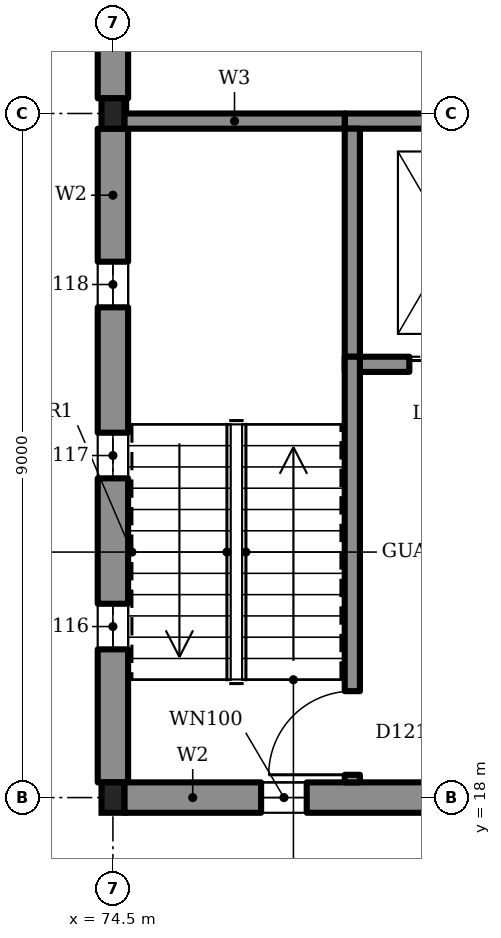
"""IFC4 building model, lengths in metres.
Left out: names, types, materials, properties, quantities, classifications, styles, units other than length and angle.
Written with IfcOpenShell. Run it as: python <this file> out.ifc"""

import sys

from ifc_helpers import new_model, si_unit, direction, frame, frame_2d, origin, origin_2d, place, context, subcontext, project, spatial, rectangle, i_section, extrude, element, fill, save


model = new_model("IFC4")
c1 = context("Model", 3, precision=1e-05, world=origin(), true_north=direction((0.0, 1.0)))
c2 = subcontext(c1, "Body", "Model", "MODEL_VIEW")
j1 = project(units=[si_unit("LENGTHUNIT", "METRE"), si_unit("PLANEANGLEUNIT", "RADIAN")], contexts=[c1])
p1 = place(None, origin())
s1 = spatial("IfcSite", under=j1, at=p1, CompositionType="ELEMENT")
p2 = place(p1, origin())
s2 = spatial("IfcBuilding", under=s1, at=p2, CompositionType="ELEMENT")
p3 = place(p2, frame((0.0, 0.0, 14.4)))
s3 = spatial("IfcBuildingStorey", under=s2, at=p3, CompositionType="ELEMENT", Elevation=14.4)
for number, where, z_axis, x_axis in (
    (1, (74.5, 18.0, 0.0), (0.0, 0.0, 1.0), (1.0, 0.0, 0.0)),
    (2, (74.5, 27.0, 0.0), (0.0, 0.0, 1.0), (1.0, 0.0, 0.0)),
):
    element("IfcColumn", number, at=place(p3, frame(where, z_axis=z_axis, x_axis=x_axis)), inside=s3, PredefinedType="COLUMN", context=c2, shape_type="SweptSolid", body=[
        extrude(i_section(OverallWidth=0.3, OverallDepth=0.4, WebThickness=0.013, FlangeThickness=0.024, FilletRadius=0.027, at=origin_2d()), origin(), (0.0, 0.0, 1.0), 4.5),
    ])
p4 = place(p3, frame((77.55, 23.7, 0.0), z_axis=(0.0, 0.0, 1.0), x_axis=(1.0, 0.0, 0.0)))
e3 = element("IfcWall", 3, at=p4, inside=s3, PredefinedType="SOLIDWALL", context=c2, shape_type="SweptSolid", body=[
    extrude(rectangle(XDim=5.4, YDim=0.2, at=frame_2d((2.7, 0.0))), origin(), (0.0, 0.0, 1.0), 4.25),
])
p5 = place(p4, frame((0.85, 0.0, 0.0)))
e4 = element("IfcOpeningElement", 4, at=p5, cuts=e3, PredefinedType="OPENING", context=c2, shape_type="SweptSolid", body=[
    extrude(rectangle(XDim=1.1, YDim=2.1, at=frame_2d((0.55, 1.05))), frame((0.0, 0.11, 0.0), z_axis=(0.0, -1.0, 0.0), x_axis=(1.0, 0.0, 0.0)), (0.0, 0.0, 1.0), 0.22),
])
p6 = place(p4, frame((3.55, 0.0, 0.0)))
e5 = element("IfcOpeningElement", 5, at=p6, cuts=e3, PredefinedType="OPENING", context=c2, shape_type="SweptSolid", body=[
    extrude(rectangle(XDim=0.9, YDim=2.1, at=frame_2d((0.45, 1.05))), frame((0.0, 0.11, 0.0), z_axis=(0.0, -1.0, 0.0), x_axis=(1.0, 0.0, 0.0)), (0.0, 0.0, 1.0), 0.22),
])
p7 = place(p3, frame((77.55, 26.9, 0.0), z_axis=(0.0, 0.0, 1.0), x_axis=(1.0, 0.0, 0.0)))
e6 = element("IfcWall", 6, at=p7, inside=s3, PredefinedType="SOLIDWALL", context=c2, shape_type="SweptSolid", body=[
    extrude(rectangle(XDim=5.4, YDim=0.2, at=frame_2d((2.7, 0.0))), origin(), (0.0, 0.0, 1.0), 4.25),
])
p8 = place(p3, frame((77.65, 23.8, 0.0), z_axis=(0.0, 0.0, 1.0), x_axis=(0.0, 1.0, 0.0)))
e7 = element("IfcWall", 7, at=p8, inside=s3, PredefinedType="SOLIDWALL", context=c2, shape_type="SweptSolid", body=[
    extrude(rectangle(XDim=3.0, YDim=0.2, at=frame_2d((1.5, 0.0))), origin(), (0.0, 0.0, 1.0), 4.25),
])
p9 = place(p3, frame((74.65, 18.0, 0.0), z_axis=(0.0, 0.0, 1.0), x_axis=(1.0, 0.0, 0.0)))
e8 = element("IfcWall", 8, at=p9, inside=s3, PredefinedType="SOLIDWALL", context=c2, shape_type="SweptSolid", body=[
    extrude(rectangle(XDim=8.7, YDim=0.4, at=frame_2d((4.35, 0.0))), origin(), (0.0, 0.0, 1.0), 4.5),
])
p10 = place(p9, frame((1.8, 0.0, 0.9)))
e9 = element("IfcOpeningElement", 9, at=p10, cuts=e8, PredefinedType="OPENING", context=c2, shape_type="SweptSolid", body=[
    extrude(rectangle(XDim=0.6, YDim=2.4, at=frame_2d((0.3, 1.2))), frame((0.0, 0.21, 0.0), z_axis=(0.0, -1.0, 0.0), x_axis=(1.0, 0.0, 0.0)), (0.0, 0.0, 1.0), 0.42),
])
p11 = place(p9, frame((4.05, 0.0, 0.9)))
e10 = element("IfcOpeningElement", 10, at=p11, cuts=e8, PredefinedType="OPENING", context=c2, shape_type="SweptSolid", body=[
    extrude(rectangle(XDim=0.6, YDim=2.4, at=frame_2d((0.3, 1.2))), frame((0.0, 0.21, 0.0), z_axis=(0.0, -1.0, 0.0), x_axis=(1.0, 0.0, 0.0)), (0.0, 0.0, 1.0), 0.42),
])
p12 = place(p9, frame((6.3, 0.0, 0.9)))
e11 = element("IfcOpeningElement", 11, at=p12, cuts=e8, PredefinedType="OPENING", context=c2, shape_type="SweptSolid", body=[
    extrude(rectangle(XDim=0.6, YDim=2.4, at=frame_2d((0.3, 1.2))), frame((0.0, 0.21, 0.0), z_axis=(0.0, -1.0, 0.0), x_axis=(1.0, 0.0, 0.0)), (0.0, 0.0, 1.0), 0.42),
])
p13 = place(p3, frame((74.5, 18.2, 0.0), z_axis=(0.0, 0.0, 1.0), x_axis=(0.0, 1.0, 0.0)))
e12 = element("IfcWall", 12, at=p13, inside=s3, PredefinedType="SOLIDWALL", context=c2, shape_type="SweptSolid", body=[
    extrude(rectangle(XDim=8.6, YDim=0.4, at=frame_2d((4.3, 0.0))), origin(), (0.0, 0.0, 1.0), 4.5),
])
p14 = place(p13, frame((1.75, 0.0, 0.9)))
e13 = element("IfcOpeningElement", 13, at=p14, cuts=e12, PredefinedType="OPENING", context=c2, shape_type="SweptSolid", body=[
    extrude(rectangle(XDim=0.6, YDim=2.4, at=frame_2d((0.3, 1.2))), frame((0.0, 0.21, 0.0), z_axis=(0.0, -1.0, 0.0), x_axis=(1.0, 0.0, 0.0)), (0.0, 0.0, 1.0), 0.42),
])
p15 = place(p13, frame((4.0, 0.0, 0.9)))
e14 = element("IfcOpeningElement", 14, at=p15, cuts=e12, PredefinedType="OPENING", context=c2, shape_type="SweptSolid", body=[
    extrude(rectangle(XDim=0.6, YDim=2.4, at=frame_2d((0.3, 1.2))), frame((0.0, 0.21, 0.0), z_axis=(0.0, -1.0, 0.0), x_axis=(1.0, 0.0, 0.0)), (0.0, 0.0, 1.0), 0.42),
])
p16 = place(p13, frame((6.25, 0.0, 0.9)))
e15 = element("IfcOpeningElement", 15, at=p16, cuts=e12, PredefinedType="OPENING", context=c2, shape_type="SweptSolid", body=[
    extrude(rectangle(XDim=0.6, YDim=2.4, at=frame_2d((0.3, 1.2))), frame((0.0, 0.21, 0.0), z_axis=(0.0, -1.0, 0.0), x_axis=(1.0, 0.0, 0.0)), (0.0, 0.0, 1.0), 0.42),
])
p17 = place(p3, frame((74.5, 27.2, 0.0), z_axis=(0.0, 0.0, 1.0), x_axis=(0.0, 1.0, 0.0)))
e16 = element("IfcWall", 16, at=p17, inside=s3, PredefinedType="SOLIDWALL", context=c2, shape_type="SweptSolid", body=[
    extrude(rectangle(XDim=8.6, YDim=0.4, at=frame_2d((4.3, 0.0))), origin(), (0.0, 0.0, 1.0), 4.5),
])
p18 = place(p17, frame((1.825, 0.0, 0.9)))
e17 = element("IfcOpeningElement", 17, at=p18, cuts=e16, PredefinedType="OPENING", context=c2, shape_type="SweptSolid", body=[
    extrude(rectangle(XDim=0.45, YDim=2.6, at=frame_2d((0.225, 1.3))), frame((0.0, 0.21, 0.0), z_axis=(0.0, -1.0, 0.0), x_axis=(1.0, 0.0, 0.0)), (0.0, 0.0, 1.0), 0.42),
])
p19 = place(p17, frame((4.075, 0.0, 0.9)))
e18 = element("IfcOpeningElement", 18, at=p19, cuts=e16, PredefinedType="OPENING", context=c2, shape_type="SweptSolid", body=[
    extrude(rectangle(XDim=0.45, YDim=2.6, at=frame_2d((0.225, 1.3))), frame((0.0, 0.21, 0.0), z_axis=(0.0, -1.0, 0.0), x_axis=(1.0, 0.0, 0.0)), (0.0, 0.0, 1.0), 0.42),
])
p20 = place(p17, frame((6.325, 0.0, 0.9)))
e19 = element("IfcOpeningElement", 19, at=p20, cuts=e16, PredefinedType="OPENING", context=c2, shape_type="SweptSolid", body=[
    extrude(rectangle(XDim=0.45, YDim=2.6, at=frame_2d((0.225, 1.3))), frame((0.0, 0.21, 0.0), z_axis=(0.0, -1.0, 0.0), x_axis=(1.0, 0.0, 0.0)), (0.0, 0.0, 1.0), 0.42),
])
p21 = place(p3, frame((74.65, 26.9, 0.0), z_axis=(0.0, 0.0, 1.0), x_axis=(1.0, 0.0, 0.0)))
e20 = element("IfcWall", 20, at=p21, inside=s3, PredefinedType="SOLIDWALL", context=c2, shape_type="SweptSolid", body=[
    extrude(rectangle(XDim=2.9, YDim=0.2, at=frame_2d((1.45, 0.0))), origin(), (0.0, 0.0, 1.0), 4.25),
])
p22 = place(p3, frame((77.65, 18.2, 0.0), z_axis=(0.0, 0.0, 1.0), x_axis=(0.0, 1.0, 0.0)))
e21 = element("IfcWall", 21, at=p22, inside=s3, PredefinedType="SOLIDWALL", context=c2, shape_type="SweptSolid", body=[
    extrude(rectangle(XDim=5.6, YDim=0.2, at=frame_2d((2.8, 0.0))), origin(), (0.0, 0.0, 1.0), 4.25),
])
p23 = place(p22, frame((0.1, 0.0, 0.0)))
e22 = element("IfcOpeningElement", 22, at=p23, cuts=e21, PredefinedType="OPENING", context=c2, shape_type="SweptSolid", body=[
    extrude(rectangle(XDim=1.1, YDim=2.1, at=frame_2d((0.55, 1.05))), frame((0.0, 0.11, 0.0), z_axis=(0.0, -1.0, 0.0), x_axis=(1.0, 0.0, 0.0)), (0.0, 0.0, 1.0), 0.22),
])
p24 = place(p5, origin())
e23 = element("IfcDoor", 23, at=p24, inside=s3, OperationType="SLIDING_TO_LEFT", PredefinedType="DOOR", context=c2, shape_type="SweptSolid", body=[
    extrude(rectangle(XDim=1.1, YDim=2.1, at=frame_2d((0.55, 1.05))), frame((0.0, 0.025, 0.0), z_axis=(0.0, -1.0, 0.0), x_axis=(1.0, 0.0, 0.0)), (0.0, 0.0, 1.0), 0.05),
])
fill(e4, e23)
p25 = place(p10, origin())
e24 = element("IfcWindow", 24, at=p25, inside=s3, PartitioningType="SINGLE_PANEL", PredefinedType="WINDOW", context=c2, shape_type="SweptSolid", body=[
    extrude(rectangle(XDim=0.6, YDim=2.4, at=frame_2d((0.3, 1.2))), frame((0.0, 0.03, 0.0), z_axis=(0.0, -1.0, 0.0), x_axis=(1.0, 0.0, 0.0)), (0.0, 0.0, 1.0), 0.06),
])
fill(e9, e24)
p26 = place(p14, origin())
e25 = element("IfcWindow", 25, at=p26, inside=s3, PartitioningType="SINGLE_PANEL", PredefinedType="WINDOW", context=c2, shape_type="SweptSolid", body=[
    extrude(rectangle(XDim=0.6, YDim=2.4, at=frame_2d((0.3, 1.2))), frame((0.0, 0.03, 0.0), z_axis=(0.0, -1.0, 0.0), x_axis=(1.0, 0.0, 0.0)), (0.0, 0.0, 1.0), 0.06),
])
fill(e13, e25)
p27 = place(p15, origin())
e26 = element("IfcWindow", 26, at=p27, inside=s3, PartitioningType="SINGLE_PANEL", PredefinedType="WINDOW", context=c2, shape_type="SweptSolid", body=[
    extrude(rectangle(XDim=0.6, YDim=2.4, at=frame_2d((0.3, 1.2))), frame((0.0, 0.03, 0.0), z_axis=(0.0, -1.0, 0.0), x_axis=(1.0, 0.0, 0.0)), (0.0, 0.0, 1.0), 0.06),
])
fill(e14, e26)
p28 = place(p16, origin())
e27 = element("IfcWindow", 27, at=p28, inside=s3, PartitioningType="SINGLE_PANEL", PredefinedType="WINDOW", context=c2, shape_type="SweptSolid", body=[
    extrude(rectangle(XDim=0.6, YDim=2.4, at=frame_2d((0.3, 1.2))), frame((0.0, 0.03, 0.0), z_axis=(0.0, -1.0, 0.0), x_axis=(1.0, 0.0, 0.0)), (0.0, 0.0, 1.0), 0.06),
])
fill(e15, e27)
p29 = place(p23, origin())
e28 = element("IfcDoor", 28, at=p29, inside=s3, OperationType="SINGLE_SWING_RIGHT", PredefinedType="DOOR", context=c2, shape_type="SweptSolid", body=[
    extrude(rectangle(XDim=1.1, YDim=2.1, at=frame_2d((0.55, 1.05))), frame((0.0, 0.025, 0.0), z_axis=(0.0, -1.0, 0.0), x_axis=(1.0, 0.0, 0.0)), (0.0, 0.0, 1.0), 0.05),
])
fill(e22, e28)
save(model, sys.argv[1])
